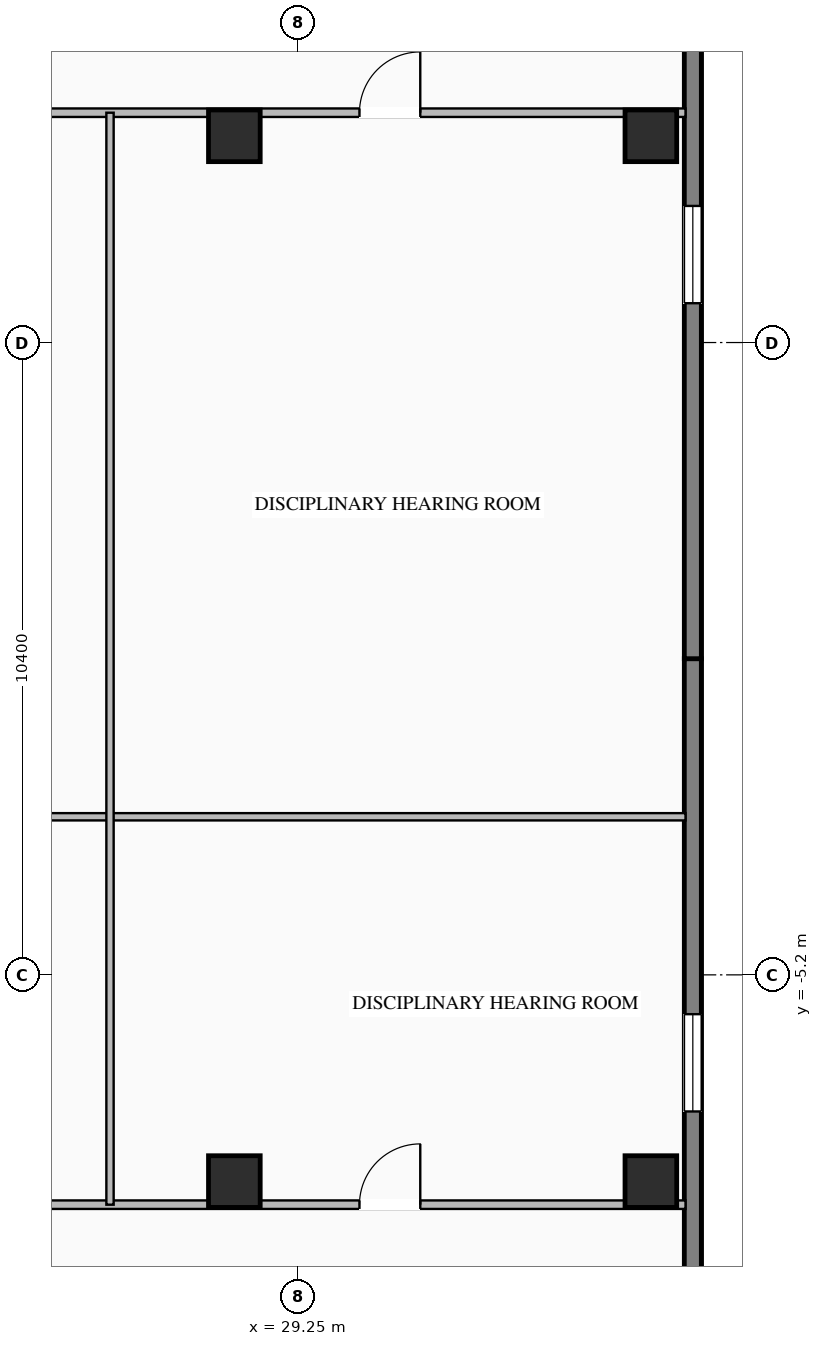
"""IFC4 building model, lengths in metres.
Left out: names, types, materials, properties, quantities, classifications, styles, units other than length and angle.
Written with IfcOpenShell. Run it as: python <this file> out.ifc"""

import sys

from ifc_helpers import new_model, si_unit, direction, frame, frame_2d, origin, origin_2d, place, context, subcontext, project, spatial, rectangle, i_section, extrude, element, fill, save


model = new_model("IFC4")
c1 = context("Model", 3, precision=1e-05, world=origin(), true_north=direction((0.0, 1.0)))
c2 = subcontext(c1, "Body", "Model", "MODEL_VIEW")
j1 = project(units=[si_unit("LENGTHUNIT", "METRE"), si_unit("PLANEANGLEUNIT", "RADIAN")], contexts=[c1])
p1 = place(None, origin())
s1 = spatial("IfcSite", under=j1, at=p1, CompositionType="ELEMENT")
p2 = place(p1, origin())
s2 = spatial("IfcBuilding", under=s1, at=p2, CompositionType="ELEMENT")
p3 = place(p2, frame((0.0, 0.0, 58.8)))
s3 = spatial("IfcBuildingStorey", under=s2, at=p3, CompositionType="ELEMENT", Elevation=58.8)
for number, where, z_axis, x_axis in (
    (1, (28.2, -8.6, 0.0), (0.0, 0.0, 1.0), (1.0, 0.0, 0.0)),
    (2, (28.2, 8.6, 0.0), (0.0, 0.0, 1.0), (1.0, 0.0, 0.0)),
    (3, (35.05, -8.6, 0.0), (0.0, 0.0, 1.0), (1.0, 0.0, 0.0)),
    (4, (35.05, 8.6, 0.0), (0.0, 0.0, 1.0), (1.0, 0.0, 0.0)),
):
    element("IfcColumn", number, at=place(p3, frame(where, z_axis=z_axis, x_axis=x_axis)), inside=s3, PredefinedType="COLUMN", context=c2, shape_type="SweptSolid", body=[
        extrude(i_section(OverallWidth=0.85, OverallDepth=0.85, WebThickness=0.032, FlangeThickness=0.048, at=origin_2d()), origin(), (0.0, 0.0, 1.0), 3.45),
    ])
p4 = place(p3, frame((35.74, 0.0, 0.0), z_axis=(0.0, 0.0, 1.0), x_axis=(0.0, -1.0, 0.0)))
e5 = element("IfcWall", 5, at=p4, inside=s3, PredefinedType="STANDARD", context=c2, shape_type="SweptSolid", body=[
    extrude(rectangle(XDim=19.94, YDim=0.28, at=frame_2d((9.97, 0.0))), origin(), (0.0, 0.0, 1.0), 3.25),
])
p5 = place(p4, frame((5.847, 0.0, 0.76)))
e6 = element("IfcOpeningElement", 6, at=p5, cuts=e5, PredefinedType="OPENING", context=c2, shape_type="SweptSolid", body=[
    extrude(rectangle(XDim=1.6, YDim=1.95, at=frame_2d((0.8, 0.975))), frame((0.0, 0.15, 0.0), z_axis=(0.0, -1.0, 0.0), x_axis=(1.0, 0.0, 0.0)), (0.0, 0.0, 1.0), 0.3),
])
p6 = place(p4, frame((11.943, 0.0, 0.76)))
e7 = element("IfcOpeningElement", 7, at=p6, cuts=e5, PredefinedType="OPENING", context=c2, shape_type="SweptSolid", body=[
    extrude(rectangle(XDim=1.6, YDim=1.95, at=frame_2d((0.8, 0.975))), frame((0.0, 0.15, 0.0), z_axis=(0.0, -1.0, 0.0), x_axis=(1.0, 0.0, 0.0)), (0.0, 0.0, 1.0), 0.3),
])
p7 = place(p3, frame((35.74, 19.94, 0.0), z_axis=(0.0, 0.0, 1.0), x_axis=(0.0, -1.0, 0.0)))
e8 = element("IfcWall", 8, at=p7, inside=s3, PredefinedType="STANDARD", context=c2, shape_type="SweptSolid", body=[
    extrude(rectangle(XDim=19.94, YDim=0.28, at=frame_2d((9.97, 0.0))), origin(), (0.0, 0.0, 1.0), 3.25),
])
p8 = place(p7, frame((6.397, 0.0, 0.76)))
e9 = element("IfcOpeningElement", 9, at=p8, cuts=e8, PredefinedType="OPENING", context=c2, shape_type="SweptSolid", body=[
    extrude(rectangle(XDim=1.6, YDim=1.95, at=frame_2d((0.8, 0.975))), frame((0.0, 0.15, 0.0), z_axis=(0.0, -1.0, 0.0), x_axis=(1.0, 0.0, 0.0)), (0.0, 0.0, 1.0), 0.3),
])
p9 = place(p7, frame((12.493, 0.0, 0.76)))
e10 = element("IfcOpeningElement", 10, at=p9, cuts=e8, PredefinedType="OPENING", context=c2, shape_type="SweptSolid", body=[
    extrude(rectangle(XDim=1.6, YDim=1.95, at=frame_2d((0.8, 0.975))), frame((0.0, 0.15, 0.0), z_axis=(0.0, -1.0, 0.0), x_axis=(1.0, 0.0, 0.0)), (0.0, 0.0, 1.0), 0.3),
])
p10 = place(p3, frame((19.05, 8.98, 0.0), z_axis=(0.0, 0.0, 1.0), x_axis=(1.0, 0.0, 0.0)))
e11 = element("IfcWall", 11, at=p10, inside=s3, PredefinedType="STANDARD", context=c2, shape_type="SweptSolid", body=[
    extrude(rectangle(XDim=16.57, YDim=0.14, at=frame_2d((8.285, 0.0))), origin(), (0.0, 0.0, 1.0), 3.25),
])
p11 = place(p10, frame((0.532, 0.0, 0.0)))
e12 = element("IfcOpeningElement", 12, at=p11, cuts=e11, PredefinedType="OPENING", context=c2, shape_type="SweptSolid", body=[
    extrude(rectangle(XDim=1.0, YDim=2.08, at=frame_2d((0.5, 1.04))), frame((0.0, 0.08, 0.0), z_axis=(0.0, -1.0, 0.0), x_axis=(1.0, 0.0, 0.0)), (0.0, 0.0, 1.0), 0.16),
])
p12 = place(p10, frame((11.208, 0.0, 0.0)))
e13 = element("IfcOpeningElement", 13, at=p12, cuts=e11, PredefinedType="OPENING", context=c2, shape_type="SweptSolid", body=[
    extrude(rectangle(XDim=1.0, YDim=2.08, at=frame_2d((0.5, 1.04))), frame((0.0, 0.08, 0.0), z_axis=(0.0, -1.0, 0.0), x_axis=(1.0, 0.0, 0.0)), (0.0, 0.0, 1.0), 0.16),
])
p13 = place(p3, frame((19.05, -8.98, 0.0), z_axis=(0.0, 0.0, 1.0), x_axis=(1.0, 0.0, 0.0)))
e14 = element("IfcWall", 14, at=p13, inside=s3, PredefinedType="STANDARD", context=c2, shape_type="SweptSolid", body=[
    extrude(rectangle(XDim=16.57, YDim=0.14, at=frame_2d((8.285, 0.0))), origin(), (0.0, 0.0, 1.0), 3.25),
])
p14 = place(p13, frame((0.532, 0.0, 0.0)))
e15 = element("IfcOpeningElement", 15, at=p14, cuts=e14, PredefinedType="OPENING", context=c2, shape_type="SweptSolid", body=[
    extrude(rectangle(XDim=1.0, YDim=2.08, at=frame_2d((0.5, 1.04))), frame((0.0, 0.08, 0.0), z_axis=(0.0, -1.0, 0.0), x_axis=(1.0, 0.0, 0.0)), (0.0, 0.0, 1.0), 0.16),
])
p15 = place(p13, frame((11.208, 0.0, 0.0)))
e16 = element("IfcOpeningElement", 16, at=p15, cuts=e14, PredefinedType="OPENING", context=c2, shape_type="SweptSolid", body=[
    extrude(rectangle(XDim=1.0, YDim=2.08, at=frame_2d((0.5, 1.04))), frame((0.0, 0.08, 0.0), z_axis=(0.0, -1.0, 0.0), x_axis=(1.0, 0.0, 0.0)), (0.0, 0.0, 1.0), 0.16),
])
p16 = place(p3, frame((19.05, -2.6, 0.0), z_axis=(0.0, 0.0, 1.0), x_axis=(1.0, 0.0, 0.0)))
e17 = element("IfcWall", 17, at=p16, inside=s3, PredefinedType="STANDARD", context=c2, shape_type="SweptSolid", body=[
    extrude(rectangle(XDim=16.57, YDim=0.12, at=frame_2d((8.285, 0.0))), origin(), (0.0, 0.0, 1.0), 3.25),
])
p17 = place(p3, frame((26.155, -8.98, 0.0), z_axis=(0.0, 0.0, 1.0), x_axis=(0.0, 1.0, 0.0)))
e18 = element("IfcWall", 18, at=p17, inside=s3, PredefinedType="STANDARD", context=c2, shape_type="SweptSolid", body=[
    extrude(rectangle(XDim=17.96, YDim=0.12, at=frame_2d((8.98, 0.0))), origin(), (0.0, 0.0, 1.0), 3.25),
])
p18 = place(p5, origin())
e19 = element("IfcWindow", 19, at=p18, inside=s3, PartitioningType="SINGLE_PANEL", PredefinedType="WINDOW", context=c2, shape_type="SweptSolid", body=[
    extrude(rectangle(XDim=1.6, YDim=1.95, at=frame_2d((0.8, 0.975))), frame((0.0, 0.03, 0.0), z_axis=(0.0, -1.0, 0.0), x_axis=(1.0, 0.0, 0.0)), (0.0, 0.0, 1.0), 0.06),
])
fill(e6, e19)
p19 = place(p9, origin())
e20 = element("IfcWindow", 20, at=p19, inside=s3, PartitioningType="SINGLE_PANEL", PredefinedType="WINDOW", context=c2, shape_type="SweptSolid", body=[
    extrude(rectangle(XDim=1.6, YDim=1.95, at=frame_2d((0.8, 0.975))), frame((0.0, 0.03, 0.0), z_axis=(0.0, -1.0, 0.0), x_axis=(1.0, 0.0, 0.0)), (0.0, 0.0, 1.0), 0.06),
])
fill(e10, e20)
p20 = place(p12, origin())
e21 = element("IfcDoor", 21, at=p20, inside=s3, OperationType="SINGLE_SWING_RIGHT", PredefinedType="DOOR", context=c2, shape_type="SweptSolid", body=[
    extrude(rectangle(XDim=1.0, YDim=2.08, at=frame_2d((0.5, 1.04))), frame((0.0, 0.025, 0.0), z_axis=(0.0, -1.0, 0.0), x_axis=(1.0, 0.0, 0.0)), (0.0, 0.0, 1.0), 0.05),
])
fill(e13, e21)
p21 = place(p15, origin())
e22 = element("IfcDoor", 22, at=p21, inside=s3, OperationType="SINGLE_SWING_RIGHT", PredefinedType="DOOR", context=c2, shape_type="SweptSolid", body=[
    extrude(rectangle(XDim=1.0, YDim=2.08, at=frame_2d((0.5, 1.04))), frame((0.0, 0.025, 0.0), z_axis=(0.0, -1.0, 0.0), x_axis=(1.0, 0.0, 0.0)), (0.0, 0.0, 1.0), 0.05),
])
fill(e16, e22)
save(model, sys.argv[1])
